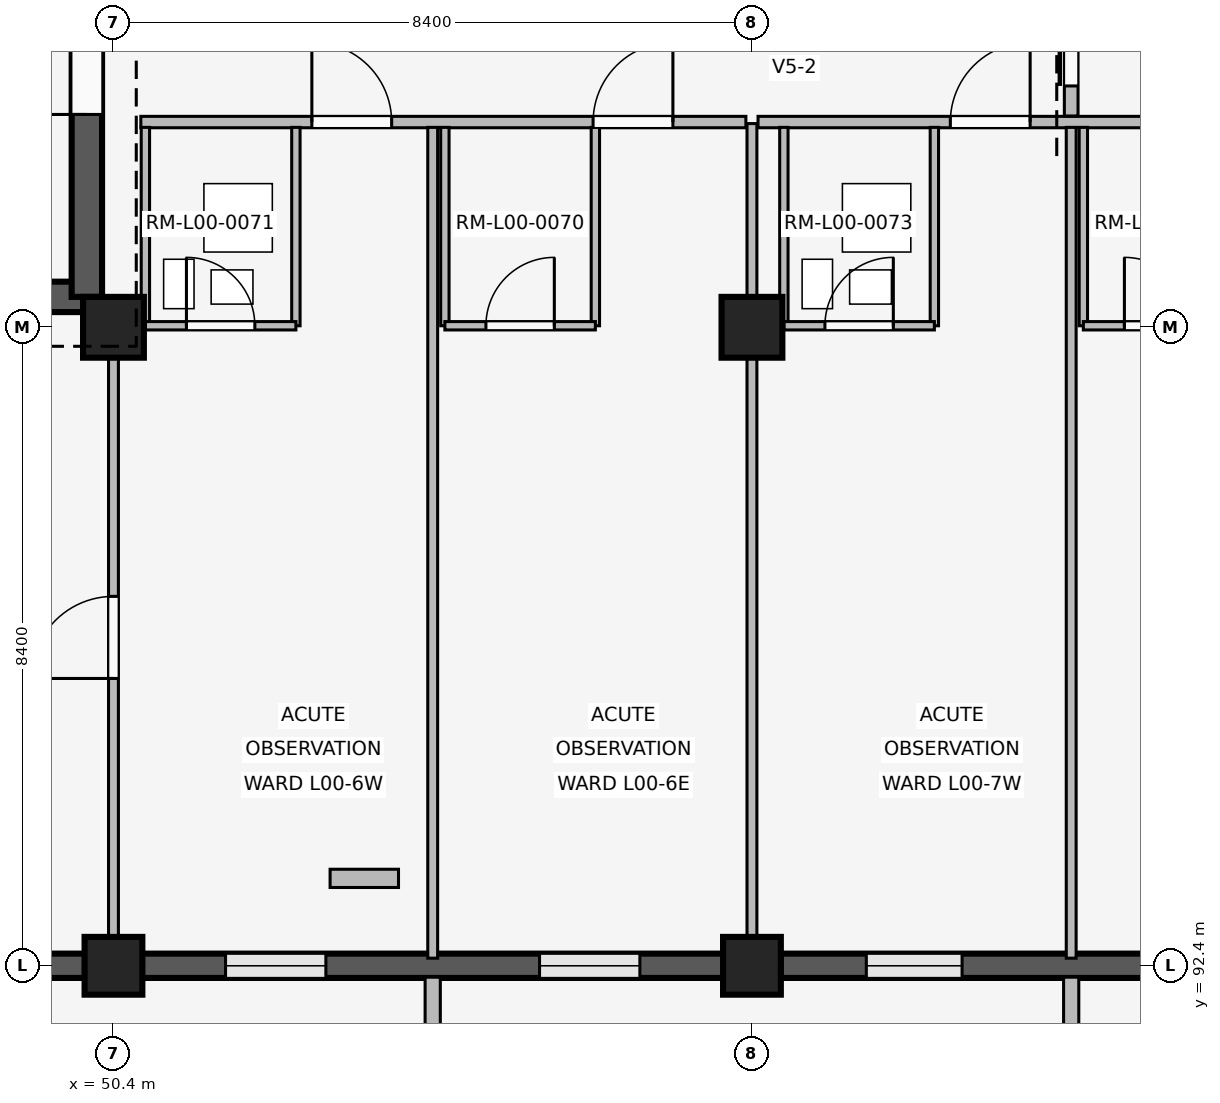
"""IFC4 building model, lengths in metres.
Left out: names, types, materials, properties, quantities, classifications, styles, units other than length and angle.
Written with IfcOpenShell. Run it as: python <this file> out.ifc"""

import sys

from ifc_helpers import new_model, si_unit, direction, frame, frame_2d, origin, origin_2d, place, context, subcontext, project, spatial, rectangle, extrude, element, fill, save


model = new_model("IFC4")
c1 = context("Model", 3, precision=1e-05, world=origin(), true_north=direction((0.0, 1.0)))
c2 = subcontext(c1, "Body", "Model", "MODEL_VIEW")
j1 = project(units=[si_unit("LENGTHUNIT", "METRE"), si_unit("PLANEANGLEUNIT", "RADIAN")], contexts=[c1])
p1 = place(None, origin())
s1 = spatial("IfcSite", under=j1, at=p1, CompositionType="ELEMENT")
p2 = place(p1, origin())
s2 = spatial("IfcBuilding", under=s1, at=p2, CompositionType="ELEMENT")
p3 = place(p2, origin())
s3 = spatial("IfcBuildingStorey", under=s2, at=p3, CompositionType="ELEMENT", Elevation=0.0)
p4 = place(p3, frame((50.4, 92.4, 0.0), z_axis=(0.0, 0.0, 1.0), x_axis=(1.0, 0.0, 0.0)))
e1 = element("IfcColumn", 1, at=p4, inside=s3, PredefinedType="COLUMN", context=c2, shape_type="SweptSolid", body=[
    extrude(rectangle(XDim=0.76, YDim=0.76, at=origin_2d()), origin(), (0.0, 0.0, 1.0), 4.8),
])
p5 = place(p3, frame((50.4, 100.8, 0.0), z_axis=(0.0, 0.0, 1.0), x_axis=(1.0, 0.0, 0.0)))
e2 = element("IfcColumn", 2, at=p5, inside=s3, PredefinedType="COLUMN", context=c2, shape_type="SweptSolid", body=[
    extrude(rectangle(XDim=0.8, YDim=0.8, at=origin_2d()), origin(), (0.0, 0.0, 1.0), 4.8),
])
p6 = place(p3, frame((58.8, 92.4, 0.0), z_axis=(0.0, 0.0, 1.0), x_axis=(1.0, 0.0, 0.0)))
e3 = element("IfcColumn", 3, at=p6, inside=s3, PredefinedType="COLUMN", context=c2, shape_type="SweptSolid", body=[
    extrude(rectangle(XDim=0.76, YDim=0.76, at=origin_2d()), origin(), (0.0, 0.0, 1.0), 4.8),
])
p7 = place(p3, frame((58.8, 100.8, 0.0), z_axis=(0.0, 0.0, 1.0), x_axis=(1.0, 0.0, 0.0)))
e4 = element("IfcColumn", 4, at=p7, inside=s3, PredefinedType="COLUMN", context=c2, shape_type="SweptSolid", body=[
    extrude(rectangle(XDim=0.8, YDim=0.8, at=origin_2d()), origin(), (0.0, 0.0, 1.0), 4.8),
])
p8 = place(p3, frame((50.025, 92.4, 0.0), z_axis=(0.0, 0.0, 1.0), x_axis=(-1.0, 0.0, 0.0)))
e5 = element("IfcWall", 5, at=p8, inside=s3, PredefinedType="SOLIDWALL", context=c2, shape_type="SweptSolid", body=[
    extrude(rectangle(XDim=7.65, YDim=0.32, at=frame_2d((3.825, 0.0))), origin(), (0.0, 0.0, 1.0), 3.82),
])
p9 = place(p8, frame((1.04, 0.0, 0.85)))
e6 = element("IfcOpeningElement", 6, at=p9, cuts=e5, PredefinedType="OPENING", context=c2, shape_type="SweptSolid", body=[
    extrude(rectangle(XDim=1.44, YDim=1.62, at=frame_2d((0.72, 0.81))), frame((0.0, 0.17, 0.0), z_axis=(0.0, -1.0, 0.0), x_axis=(1.0, 0.0, 0.0)), (0.0, 0.0, 1.0), 0.34),
])
p10 = place(p8, frame((5.17, 0.0, 0.85)))
e7 = element("IfcOpeningElement", 7, at=p10, cuts=e5, PredefinedType="OPENING", context=c2, shape_type="SweptSolid", body=[
    extrude(rectangle(XDim=1.44, YDim=1.62, at=frame_2d((0.72, 0.81))), frame((0.0, 0.17, 0.0), z_axis=(0.0, -1.0, 0.0), x_axis=(1.0, 0.0, 0.0)), (0.0, 0.0, 1.0), 0.34),
])
p11 = place(p3, frame((58.425, 92.4, 0.0), z_axis=(0.0, 0.0, 1.0), x_axis=(-1.0, 0.0, 0.0)))
e8 = element("IfcWall", 8, at=p11, inside=s3, PredefinedType="SOLIDWALL", context=c2, shape_type="SweptSolid", body=[
    extrude(rectangle(XDim=7.65, YDim=0.32, at=frame_2d((3.825, 0.0))), origin(), (0.0, 0.0, 1.0), 3.82),
])
p12 = place(p11, frame((1.1, 0.0, 0.85)))
e9 = element("IfcOpeningElement", 9, at=p12, cuts=e8, PredefinedType="OPENING", context=c2, shape_type="SweptSolid", body=[
    extrude(rectangle(XDim=1.32, YDim=1.58, at=frame_2d((0.66, 0.79))), frame((0.0, 0.17, 0.0), z_axis=(0.0, -1.0, 0.0), x_axis=(1.0, 0.0, 0.0)), (0.0, 0.0, 1.0), 0.34),
])
p13 = place(p11, frame((5.23, 0.0, 0.85)))
e10 = element("IfcOpeningElement", 10, at=p13, cuts=e8, PredefinedType="OPENING", context=c2, shape_type="SweptSolid", body=[
    extrude(rectangle(XDim=1.32, YDim=1.58, at=frame_2d((0.66, 0.79))), frame((0.0, 0.17, 0.0), z_axis=(0.0, -1.0, 0.0), x_axis=(1.0, 0.0, 0.0)), (0.0, 0.0, 1.0), 0.34),
])
p14 = place(p3, frame((54.6, 92.25, 0.0), z_axis=(0.0, 0.0, 1.0), x_axis=(0.0, -1.0, 0.0)))
e11 = element("IfcWall", 11, at=p14, inside=s3, PredefinedType="ELEMENTEDWALL", context=c2, shape_type="SweptSolid", body=[
    extrude(rectangle(XDim=0.85, YDim=0.2, at=frame_2d((0.425, 0.0))), origin(), (0.0, 0.0, 1.0), 3.8),
])
p15 = place(p3, frame((66.825, 92.4, 0.0), z_axis=(0.0, 0.0, 1.0), x_axis=(-1.0, 0.0, 0.0)))
e12 = element("IfcWall", 12, at=p15, inside=s3, PredefinedType="SOLIDWALL", context=c2, shape_type="SweptSolid", body=[
    extrude(rectangle(XDim=7.65, YDim=0.32, at=frame_2d((3.825, 0.0))), origin(), (0.0, 0.0, 1.0), 3.82),
])
p16 = place(p15, frame((1.129, 0.0, 0.85)))
e13 = element("IfcOpeningElement", 13, at=p16, cuts=e12, PredefinedType="OPENING", context=c2, shape_type="SweptSolid", body=[
    extrude(rectangle(XDim=1.26, YDim=1.52, at=frame_2d((0.63, 0.76))), frame((0.0, 0.17, 0.0), z_axis=(0.0, -1.0, 0.0), x_axis=(1.0, 0.0, 0.0)), (0.0, 0.0, 1.0), 0.34),
])
p17 = place(p15, frame((5.26, 0.0, 0.85)))
e14 = element("IfcOpeningElement", 14, at=p17, cuts=e12, PredefinedType="OPENING", context=c2, shape_type="SweptSolid", body=[
    extrude(rectangle(XDim=1.26, YDim=1.52, at=frame_2d((0.63, 0.76))), frame((0.0, 0.17, 0.0), z_axis=(0.0, -1.0, 0.0), x_axis=(1.0, 0.0, 0.0)), (0.0, 0.0, 1.0), 0.34),
])
p18 = place(p3, frame((63.0, 92.25, 0.0), z_axis=(0.0, 0.0, 1.0), x_axis=(0.0, -1.0, 0.0)))
e15 = element("IfcWall", 15, at=p18, inside=s3, PredefinedType="ELEMENTEDWALL", context=c2, shape_type="SweptSolid", body=[
    extrude(rectangle(XDim=0.85, YDim=0.2, at=frame_2d((0.425, 0.0))), origin(), (0.0, 0.0, 1.0), 3.8),
])
p19 = place(p3, frame((42.55, 101.2, 0.0), z_axis=(0.0, 0.0, 1.0), x_axis=(1.0, 0.0, 0.0)))
e16 = element("IfcWall", 16, at=p19, inside=s3, PredefinedType="SHEAR", context=c2, shape_type="SweptSolid", body=[
    extrude(rectangle(XDim=7.5, YDim=0.4, at=frame_2d((3.75, 0.0))), origin(), (0.0, 0.0, 1.0), 4.52),
])
p20 = place(p19, frame((4.85, 0.0, 0.0)))
e17 = element("IfcOpeningElement", 17, at=p20, cuts=e16, PredefinedType="OPENING", context=c2, shape_type="SweptSolid", body=[
    extrude(rectangle(XDim=1.2, YDim=2.2, at=frame_2d((0.6, 1.1))), frame((0.0, 0.21, 0.0), z_axis=(0.0, -1.0, 0.0), x_axis=(1.0, 0.0, 0.0)), (0.0, 0.0, 1.0), 0.42),
])
p21 = place(p3, frame((50.05, 101.2, 0.0), z_axis=(0.0, 0.0, 1.0), x_axis=(0.0, 1.0, 0.0)))
e18 = element("IfcWall", 18, at=p21, inside=s3, PredefinedType="SHEAR", context=c2, shape_type="SweptSolid", body=[
    extrude(rectangle(XDim=7.55, YDim=0.4, at=frame_2d((3.775, 0.0))), origin(), (0.0, 0.0, 1.0), 4.52),
])
p22 = place(p21, frame((2.4, 0.0, 0.0)))
e19 = element("IfcOpeningElement", 19, at=p22, cuts=e18, PredefinedType="OPENING", context=c2, shape_type="SweptSolid", body=[
    extrude(rectangle(XDim=1.2, YDim=2.2, at=frame_2d((0.6, 1.1))), frame((0.0, 0.21, 0.0), z_axis=(0.0, -1.0, 0.0), x_axis=(1.0, 0.0, 0.0)), (0.0, 0.0, 1.0), 0.42),
])
p23 = place(p3, frame((50.4, 92.54, 0.0), z_axis=(0.0, 0.0, 1.0), x_axis=(0.0, 1.0, 0.0)))
e20 = element("IfcWall", 20, at=p23, inside=s3, PredefinedType="PARTITIONING", context=c2, shape_type="SweptSolid", body=[
    extrude(rectangle(XDim=8.21, YDim=0.13, at=frame_2d((4.105, 0.0))), origin(), (0.0, 0.0, 1.0), 3.8),
])
p24 = place(p23, frame((3.64, 0.0, 0.0)))
e21 = element("IfcOpeningElement", 21, at=p24, cuts=e20, PredefinedType="OPENING", context=c2, shape_type="SweptSolid", body=[
    extrude(rectangle(XDim=1.08, YDim=2.15, at=frame_2d((0.54, 1.075))), frame((0.0, 0.075, 0.0), z_axis=(0.0, -1.0, 0.0), x_axis=(1.0, 0.0, 0.0)), (0.0, 0.0, 1.0), 0.15),
])
p25 = place(p3, frame((50.76, 103.5, 0.0), z_axis=(0.0, 0.0, 1.0), x_axis=(1.0, 0.0, 0.0)))
e22 = element("IfcWall", 22, at=p25, inside=s3, PredefinedType="PARTITIONING", context=c2, shape_type="SweptSolid", body=[
    extrude(rectangle(XDim=7.96, YDim=0.15, at=frame_2d((3.98, 0.0))), origin(), (0.0, 0.0, 1.0), 3.8),
])
p26 = place(p25, frame((2.25, 0.0, 0.0)))
e23 = element("IfcOpeningElement", 23, at=p26, cuts=e22, PredefinedType="OPENING", context=c2, shape_type="SweptSolid", body=[
    extrude(rectangle(XDim=1.05, YDim=2.2, at=frame_2d((0.525, 1.1))), frame((0.0, 0.085, 0.0), z_axis=(0.0, -1.0, 0.0), x_axis=(1.0, 0.0, 0.0)), (0.0, 0.0, 1.0), 0.17),
])
p27 = place(p25, frame((5.95, 0.0, 0.0)))
e24 = element("IfcOpeningElement", 24, at=p27, cuts=e22, PredefinedType="OPENING", context=c2, shape_type="SweptSolid", body=[
    extrude(rectangle(XDim=1.05, YDim=2.2, at=frame_2d((0.525, 1.1))), frame((0.0, 0.085, 0.0), z_axis=(0.0, -1.0, 0.0), x_axis=(1.0, 0.0, 0.0)), (0.0, 0.0, 1.0), 0.17),
])
p28 = place(p3, frame((54.6, 92.5, 0.0), z_axis=(0.0, 0.0, 1.0), x_axis=(0.0, 1.0, 0.0)))
e25 = element("IfcWall", 25, at=p28, inside=s3, PredefinedType="PARTITIONING", context=c2, shape_type="SweptSolid", body=[
    extrude(rectangle(XDim=10.93, YDim=0.13, at=frame_2d((5.465, 0.0))), origin(), (0.0, 0.0, 1.0), 3.8),
])
for number, where, z_axis, x_axis in (
    (26, (50.82, 100.82, 0.0), (0.0, 0.0, 1.0), (0.0, 1.0, 0.0)),
    (27, (52.8, 100.82, 0.0), (0.0, 0.0, 1.0), (0.0, 1.0, 0.0)),
):
    element("IfcWall", number, at=place(p3, frame(where, z_axis=z_axis, x_axis=x_axis)), inside=s3, PredefinedType="PARTITIONING", context=c2, shape_type="SweptSolid", body=[
        extrude(rectangle(XDim=2.61, YDim=0.11, at=frame_2d((1.305, 0.0))), origin(), (0.0, 0.0, 1.0), 3.8),
    ])
p29 = place(p3, frame((50.82, 100.82, 0.0), z_axis=(0.0, 0.0, 1.0), x_axis=(1.0, 0.0, 0.0)))
e28 = element("IfcWall", 28, at=p29, inside=s3, PredefinedType="PARTITIONING", context=c2, shape_type="SweptSolid", body=[
    extrude(rectangle(XDim=1.98, YDim=0.11, at=frame_2d((0.99, 0.0))), origin(), (0.0, 0.0, 1.0), 3.8),
])
p30 = place(p29, frame((0.54, 0.0, 0.0)))
e29 = element("IfcOpeningElement", 29, at=p30, cuts=e28, PredefinedType="OPENING", context=c2, shape_type="SweptSolid", body=[
    extrude(rectangle(XDim=0.9, YDim=2.1, at=frame_2d((0.45, 1.05))), frame((0.0, 0.065, 0.0), z_axis=(0.0, -1.0, 0.0), x_axis=(1.0, 0.0, 0.0)), (0.0, 0.0, 1.0), 0.13),
])
for number, where, z_axis, x_axis in (
    (30, (54.76, 100.82, 0.0), (0.0, 0.0, 1.0), (0.0, 1.0, 0.0)),
    (31, (56.74, 100.82, 0.0), (0.0, 0.0, 1.0), (0.0, 1.0, 0.0)),
):
    element("IfcWall", number, at=place(p3, frame(where, z_axis=z_axis, x_axis=x_axis)), inside=s3, PredefinedType="PARTITIONING", context=c2, shape_type="SweptSolid", body=[
        extrude(rectangle(XDim=2.61, YDim=0.11, at=frame_2d((1.305, 0.0))), origin(), (0.0, 0.0, 1.0), 3.8),
    ])
p31 = place(p3, frame((54.76, 100.82, 0.0), z_axis=(0.0, 0.0, 1.0), x_axis=(1.0, 0.0, 0.0)))
e32 = element("IfcWall", 32, at=p31, inside=s3, PredefinedType="PARTITIONING", context=c2, shape_type="SweptSolid", body=[
    extrude(rectangle(XDim=1.98, YDim=0.11, at=frame_2d((0.99, 0.0))), origin(), (0.0, 0.0, 1.0), 3.8),
])
p32 = place(p31, frame((0.54, 0.0, 0.0)))
e33 = element("IfcOpeningElement", 33, at=p32, cuts=e32, PredefinedType="OPENING", context=c2, shape_type="SweptSolid", body=[
    extrude(rectangle(XDim=0.9, YDim=2.1, at=frame_2d((0.45, 1.05))), frame((0.0, 0.065, 0.0), z_axis=(0.0, -1.0, 0.0), x_axis=(1.0, 0.0, 0.0)), (0.0, 0.0, 1.0), 0.13),
])
p33 = place(p3, frame((53.25, 93.55, 0.0), z_axis=(0.0, 0.0, 1.0), x_axis=(1.0, 0.0, 0.0)))
e34 = element("IfcWall", 34, at=p33, inside=s3, PredefinedType="PLUMBINGWALL", context=c2, shape_type="SweptSolid", body=[
    extrude(rectangle(XDim=0.9, YDim=0.24, at=frame_2d((0.45, 0.0))), origin(), (0.0, 0.0, 1.0), 3.8),
])
p34 = place(p3, frame((58.8, 92.54, 0.0), z_axis=(0.0, 0.0, 1.0), x_axis=(0.0, 1.0, 0.0)))
e35 = element("IfcWall", 35, at=p34, inside=s3, PredefinedType="PARTITIONING", context=c2, shape_type="SweptSolid", body=[
    extrude(rectangle(XDim=10.94, YDim=0.13, at=frame_2d((5.47, 0.0))), origin(), (0.0, 0.0, 1.0), 3.8),
])
p35 = place(p3, frame((58.88, 103.5, 0.0), z_axis=(0.0, 0.0, 1.0), x_axis=(1.0, 0.0, 0.0)))
e36 = element("IfcWall", 36, at=p35, inside=s3, PredefinedType="PARTITIONING", context=c2, shape_type="SweptSolid", body=[
    extrude(rectangle(XDim=8.24, YDim=0.15, at=frame_2d((4.12, 0.0))), origin(), (0.0, 0.0, 1.0), 3.8),
])
p36 = place(p35, frame((2.53, 0.0, 0.0)))
e37 = element("IfcOpeningElement", 37, at=p36, cuts=e36, PredefinedType="OPENING", context=c2, shape_type="SweptSolid", body=[
    extrude(rectangle(XDim=1.05, YDim=2.2, at=frame_2d((0.525, 1.1))), frame((0.0, 0.085, 0.0), z_axis=(0.0, -1.0, 0.0), x_axis=(1.0, 0.0, 0.0)), (0.0, 0.0, 1.0), 0.17),
])
p37 = place(p35, frame((6.23, 0.0, 0.0)))
e38 = element("IfcOpeningElement", 38, at=p37, cuts=e36, PredefinedType="OPENING", context=c2, shape_type="SweptSolid", body=[
    extrude(rectangle(XDim=1.05, YDim=2.2, at=frame_2d((0.525, 1.1))), frame((0.0, 0.085, 0.0), z_axis=(0.0, -1.0, 0.0), x_axis=(1.0, 0.0, 0.0)), (0.0, 0.0, 1.0), 0.17),
])
p38 = place(p3, frame((63.0, 92.5, 0.0), z_axis=(0.0, 0.0, 1.0), x_axis=(0.0, 1.0, 0.0)))
e39 = element("IfcWall", 39, at=p38, inside=s3, PredefinedType="PARTITIONING", context=c2, shape_type="SweptSolid", body=[
    extrude(rectangle(XDim=10.93, YDim=0.13, at=frame_2d((5.465, 0.0))), origin(), (0.0, 0.0, 1.0), 3.8),
])
for number, where, z_axis, x_axis in (
    (40, (59.22, 100.82, 0.0), (0.0, 0.0, 1.0), (0.0, 1.0, 0.0)),
    (41, (61.2, 100.82, 0.0), (0.0, 0.0, 1.0), (0.0, 1.0, 0.0)),
):
    element("IfcWall", number, at=place(p3, frame(where, z_axis=z_axis, x_axis=x_axis)), inside=s3, PredefinedType="PARTITIONING", context=c2, shape_type="SweptSolid", body=[
        extrude(rectangle(XDim=2.61, YDim=0.11, at=frame_2d((1.305, 0.0))), origin(), (0.0, 0.0, 1.0), 3.8),
    ])
p39 = place(p3, frame((59.22, 100.82, 0.0), z_axis=(0.0, 0.0, 1.0), x_axis=(1.0, 0.0, 0.0)))
e42 = element("IfcWall", 42, at=p39, inside=s3, PredefinedType="PARTITIONING", context=c2, shape_type="SweptSolid", body=[
    extrude(rectangle(XDim=1.98, YDim=0.11, at=frame_2d((0.99, 0.0))), origin(), (0.0, 0.0, 1.0), 3.8),
])
p40 = place(p39, frame((0.54, 0.0, 0.0)))
e43 = element("IfcOpeningElement", 43, at=p40, cuts=e42, PredefinedType="OPENING", context=c2, shape_type="SweptSolid", body=[
    extrude(rectangle(XDim=0.9, YDim=2.1, at=frame_2d((0.45, 1.05))), frame((0.0, 0.065, 0.0), z_axis=(0.0, -1.0, 0.0), x_axis=(1.0, 0.0, 0.0)), (0.0, 0.0, 1.0), 0.13),
])
p41 = place(p3, frame((63.16, 100.82, 0.0), z_axis=(0.0, 0.0, 1.0), x_axis=(0.0, 1.0, 0.0)))
e44 = element("IfcWall", 44, at=p41, inside=s3, PredefinedType="PARTITIONING", context=c2, shape_type="SweptSolid", body=[
    extrude(rectangle(XDim=2.61, YDim=0.11, at=frame_2d((1.305, 0.0))), origin(), (0.0, 0.0, 1.0), 3.8),
])
p42 = place(p3, frame((63.16, 100.82, 0.0), z_axis=(0.0, 0.0, 1.0), x_axis=(1.0, 0.0, 0.0)))
e45 = element("IfcWall", 45, at=p42, inside=s3, PredefinedType="PARTITIONING", context=c2, shape_type="SweptSolid", body=[
    extrude(rectangle(XDim=1.98, YDim=0.11, at=frame_2d((0.99, 0.0))), origin(), (0.0, 0.0, 1.0), 3.8),
])
p43 = place(p42, frame((0.54, 0.0, 0.0)))
e46 = element("IfcOpeningElement", 46, at=p43, cuts=e45, PredefinedType="OPENING", context=c2, shape_type="SweptSolid", body=[
    extrude(rectangle(XDim=0.9, YDim=2.1, at=frame_2d((0.45, 1.05))), frame((0.0, 0.065, 0.0), z_axis=(0.0, -1.0, 0.0), x_axis=(1.0, 0.0, 0.0)), (0.0, 0.0, 1.0), 0.13),
])
p44 = place(p3, frame((63.0, 103.58, 0.0), z_axis=(0.0, 0.0, 1.0), x_axis=(0.0, 1.0, 0.0)))
e47 = element("IfcWall", 47, at=p44, inside=s3, PredefinedType="PARTITIONING", context=c2, shape_type="SweptSolid", body=[
    extrude(rectangle(XDim=2.84, YDim=0.18, at=frame_2d((1.42, 0.0))), origin(), (0.0, 0.0, 1.0), 3.8),
])
p45 = place(p44, frame((0.395, 0.0, 0.0)))
e48 = element("IfcOpeningElement", 48, at=p45, cuts=e47, PredefinedType="OPENING", context=c2, shape_type="SweptSolid", body=[
    extrude(rectangle(XDim=2.05, YDim=2.35, at=frame_2d((1.025, 1.175))), frame((0.0, 0.1, 0.0), z_axis=(0.0, -1.0, 0.0), x_axis=(1.0, 0.0, 0.0)), (0.0, 0.0, 1.0), 0.2),
])
p46 = place(p12, origin())
e49 = element("IfcWindow", 49, at=p46, inside=s3, PartitioningType="SINGLE_PANEL", PredefinedType="WINDOW", context=c2, shape_type="SweptSolid", body=[
    extrude(rectangle(XDim=1.32, YDim=1.58, at=frame_2d((0.66, 0.79))), frame((0.0, 0.03, 0.0), z_axis=(0.0, -1.0, 0.0), x_axis=(1.0, 0.0, 0.0)), (0.0, 0.0, 1.0), 0.06),
])
fill(e9, e49)
p47 = place(p13, origin())
e50 = element("IfcWindow", 50, at=p47, inside=s3, PartitioningType="SINGLE_PANEL", PredefinedType="WINDOW", context=c2, shape_type="SweptSolid", body=[
    extrude(rectangle(XDim=1.32, YDim=1.58, at=frame_2d((0.66, 0.79))), frame((0.0, 0.03, 0.0), z_axis=(0.0, -1.0, 0.0), x_axis=(1.0, 0.0, 0.0)), (0.0, 0.0, 1.0), 0.06),
])
fill(e10, e50)
p48 = place(p17, origin())
e51 = element("IfcWindow", 51, at=p48, inside=s3, PartitioningType="SINGLE_PANEL", PredefinedType="WINDOW", context=c2, shape_type="SweptSolid", body=[
    extrude(rectangle(XDim=1.26, YDim=1.52, at=frame_2d((0.63, 0.76))), frame((0.0, 0.03, 0.0), z_axis=(0.0, -1.0, 0.0), x_axis=(1.0, 0.0, 0.0)), (0.0, 0.0, 1.0), 0.06),
])
fill(e14, e51)
p49 = place(p22, origin())
e52 = element("IfcDoor", 52, at=p49, inside=s3, OperationType="SINGLE_SWING_LEFT", PredefinedType="DOOR", context=c2, shape_type="SweptSolid", body=[
    extrude(rectangle(XDim=1.2, YDim=2.2, at=frame_2d((0.6, 1.1))), frame((0.0, 0.025, 0.0), z_axis=(0.0, -1.0, 0.0), x_axis=(1.0, 0.0, 0.0)), (0.0, 0.0, 1.0), 0.05),
])
fill(e19, e52)
p50 = place(p24, origin())
e53 = element("IfcDoor", 53, at=p50, inside=s3, OperationType="SINGLE_SWING_LEFT", PredefinedType="DOOR", context=c2, shape_type="SweptSolid", body=[
    extrude(rectangle(XDim=1.08, YDim=2.15, at=frame_2d((0.54, 1.075))), frame((0.0, 0.025, 0.0), z_axis=(0.0, -1.0, 0.0), x_axis=(1.0, 0.0, 0.0)), (0.0, 0.0, 1.0), 0.05),
])
fill(e21, e53)
p51 = place(p26, origin())
e54 = element("IfcDoor", 54, at=p51, inside=s3, OperationType="SINGLE_SWING_LEFT", PredefinedType="DOOR", context=c2, shape_type="SweptSolid", body=[
    extrude(rectangle(XDim=1.05, YDim=2.2, at=frame_2d((0.525, 1.1))), frame((0.0, 0.025, 0.0), z_axis=(0.0, -1.0, 0.0), x_axis=(1.0, 0.0, 0.0)), (0.0, 0.0, 1.0), 0.05),
])
fill(e23, e54)
p52 = place(p27, origin())
e55 = element("IfcDoor", 55, at=p52, inside=s3, OperationType="SINGLE_SWING_RIGHT", PredefinedType="DOOR", context=c2, shape_type="SweptSolid", body=[
    extrude(rectangle(XDim=1.05, YDim=2.2, at=frame_2d((0.525, 1.1))), frame((0.0, 0.025, 0.0), z_axis=(0.0, -1.0, 0.0), x_axis=(1.0, 0.0, 0.0)), (0.0, 0.0, 1.0), 0.05),
])
fill(e24, e55)
p53 = place(p30, origin())
e56 = element("IfcDoor", 56, at=p53, inside=s3, OperationType="SINGLE_SWING_LEFT", PredefinedType="DOOR", context=c2, shape_type="SweptSolid", body=[
    extrude(rectangle(XDim=0.9, YDim=2.1, at=frame_2d((0.45, 1.05))), frame((0.0, 0.025, 0.0), z_axis=(0.0, -1.0, 0.0), x_axis=(1.0, 0.0, 0.0)), (0.0, 0.0, 1.0), 0.05),
])
fill(e29, e56)
p54 = place(p32, origin())
e57 = element("IfcDoor", 57, at=p54, inside=s3, OperationType="SINGLE_SWING_RIGHT", PredefinedType="DOOR", context=c2, shape_type="SweptSolid", body=[
    extrude(rectangle(XDim=0.9, YDim=2.1, at=frame_2d((0.45, 1.05))), frame((0.0, 0.025, 0.0), z_axis=(0.0, -1.0, 0.0), x_axis=(1.0, 0.0, 0.0)), (0.0, 0.0, 1.0), 0.05),
])
fill(e33, e57)
p55 = place(p36, origin())
e58 = element("IfcDoor", 58, at=p55, inside=s3, OperationType="SINGLE_SWING_RIGHT", PredefinedType="DOOR", context=c2, shape_type="SweptSolid", body=[
    extrude(rectangle(XDim=1.05, YDim=2.2, at=frame_2d((0.525, 1.1))), frame((0.0, 0.025, 0.0), z_axis=(0.0, -1.0, 0.0), x_axis=(1.0, 0.0, 0.0)), (0.0, 0.0, 1.0), 0.05),
])
fill(e37, e58)
p56 = place(p40, origin())
e59 = element("IfcDoor", 59, at=p56, inside=s3, OperationType="SINGLE_SWING_RIGHT", PredefinedType="DOOR", context=c2, shape_type="SweptSolid", body=[
    extrude(rectangle(XDim=0.9, YDim=2.1, at=frame_2d((0.45, 1.05))), frame((0.0, 0.025, 0.0), z_axis=(0.0, -1.0, 0.0), x_axis=(1.0, 0.0, 0.0)), (0.0, 0.0, 1.0), 0.05),
])
fill(e43, e59)
p57 = place(p43, origin())
e60 = element("IfcDoor", 60, at=p57, inside=s3, OperationType="SINGLE_SWING_LEFT", PredefinedType="DOOR", context=c2, shape_type="SweptSolid", body=[
    extrude(rectangle(XDim=0.9, YDim=2.1, at=frame_2d((0.45, 1.05))), frame((0.0, 0.025, 0.0), z_axis=(0.0, -1.0, 0.0), x_axis=(1.0, 0.0, 0.0)), (0.0, 0.0, 1.0), 0.05),
])
fill(e46, e60)
p58 = place(p45, origin())
e61 = element("IfcDoor", 61, at=p58, inside=s3, OperationType="SLIDING_TO_LEFT", PredefinedType="DOOR", context=c2, shape_type="SweptSolid", body=[
    extrude(rectangle(XDim=2.05, YDim=2.35, at=frame_2d((1.025, 1.175))), frame((0.0, 0.025, 0.0), z_axis=(0.0, -1.0, 0.0), x_axis=(1.0, 0.0, 0.0)), (0.0, 0.0, 1.0), 0.05),
])
fill(e48, e61)
save(model, sys.argv[1])
